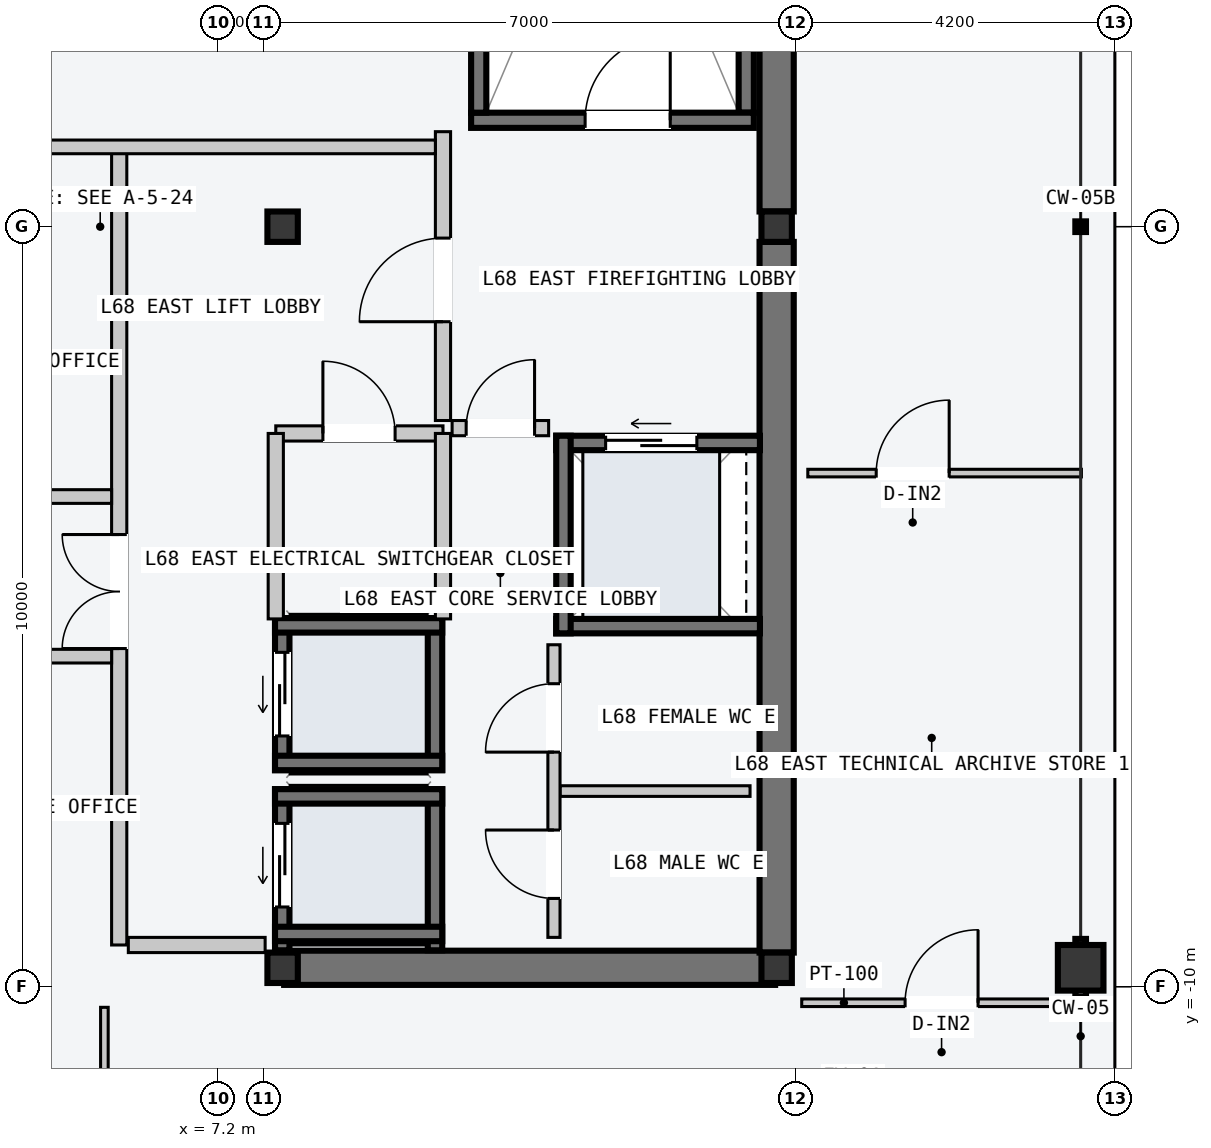
"""IFC4 building model, lengths in metres.
Left out: names, types, materials, properties, quantities, classifications, styles, units other than length and angle.
Written with IfcOpenShell. Run it as: python <this file> out.ifc"""

import sys

from ifc_helpers import new_model, si_unit, direction, frame, frame_2d, origin, origin_2d, place, context, subcontext, project, spatial, rectangle, hollow_rectangle, i_section, extrude, element, fill, save


model = new_model("IFC4")
c1 = context("Model", 3, precision=1e-05, world=origin(), true_north=direction((0.0, 1.0)))
c2 = subcontext(c1, "Body", "Model", "MODEL_VIEW")
j1 = project(units=[si_unit("LENGTHUNIT", "METRE"), si_unit("PLANEANGLEUNIT", "RADIAN")], contexts=[c1])
p1 = place(None, origin())
s1 = spatial("IfcSite", under=j1, at=p1, CompositionType="ELEMENT")
p2 = place(p1, origin())
s2 = spatial("IfcBuilding", under=s1, at=p2, CompositionType="ELEMENT")
p3 = place(p2, frame((0.0, 0.0, 258.0)))
s3 = spatial("IfcBuildingStorey", under=s2, at=p3, CompositionType="ELEMENT", Elevation=258.0)
p4 = place(p3, frame((8.07, -9.75, -0.2), z_axis=(0.0, 0.0, 1.0), x_axis=(1.0, 0.0, 0.0)))
e1 = element("IfcWall", 1, at=p4, inside=s3, PredefinedType="SHEAR", context=c2, shape_type="SweptSolid", body=[
    extrude(rectangle(XDim=6.46, YDim=0.45, at=frame_2d((3.23, 0.0))), origin(), (0.0, 0.0, 1.0), 3.6),
])
for number, where, z_axis, x_axis in (
    (2, (14.55, -9.55, -0.2), (0.0, 0.0, 1.0), (0.0, 1.0, 0.0)),
    (3, (14.55, 0.2, -0.2), (0.0, 0.0, 1.0), (0.0, 1.0, 0.0)),
):
    element("IfcWall", number, at=place(p3, frame(where, z_axis=z_axis, x_axis=x_axis)), inside=s3, PredefinedType="SHEAR", context=c2, shape_type="SweptSolid", body=[
        extrude(rectangle(XDim=9.35, YDim=0.45, at=frame_2d((4.675, 0.0))), origin(), (0.0, 0.0, 1.0), 3.6),
    ])
p5 = place(p3, frame((14.15, 1.5, -0.2), z_axis=(0.0, 0.0, 1.0), x_axis=(0.0, 1.0, 0.0)))
e4 = element("IfcWall", 4, at=p5, inside=s3, PredefinedType="SOLIDWALL", context=c2, shape_type="SweptSolid", body=[
    extrude(rectangle(XDim=7.8, YDim=0.2, at=frame_2d((3.9, 0.0))), origin(), (0.0, 0.0, 1.0), 3.6),
])
p6 = place(p3, frame((10.53, 1.4, -0.2), z_axis=(0.0, 0.0, 1.0), x_axis=(1.0, 0.0, 0.0)))
e5 = element("IfcWall", 5, at=p6, inside=s3, PredefinedType="SOLIDWALL", context=c2, shape_type="SweptSolid", body=[
    extrude(rectangle(XDim=3.72, YDim=0.2, at=frame_2d((1.86, 0.0))), origin(), (0.0, 0.0, 1.0), 3.6),
])
p7 = place(p6, frame((1.5, 0.0, 0.2)))
e6 = element("IfcOpeningElement", 6, at=p7, cuts=e5, PredefinedType="OPENING", context=c2, shape_type="SweptSolid", body=[
    extrude(rectangle(XDim=1.12, YDim=2.18, at=frame_2d((0.56, 1.09))), frame((0.0, 0.11, 0.0), z_axis=(0.0, -1.0, 0.0), x_axis=(1.0, 0.0, 0.0)), (0.0, 0.0, 1.0), 0.22),
])
p8 = place(p3, frame((10.63, 1.5, -0.2), z_axis=(0.0, 0.0, 1.0), x_axis=(0.0, 1.0, 0.0)))
e7 = element("IfcWall", 7, at=p8, inside=s3, PredefinedType="SOLIDWALL", context=c2, shape_type="SweptSolid", body=[
    extrude(rectangle(XDim=7.8, YDim=0.2, at=frame_2d((3.9, 0.0))), origin(), (0.0, 0.0, 1.0), 3.6),
])
for number, where, z_axis, x_axis in (
    (8, (8.05, -9.75, 0.0), (0.0, 0.0, 1.0), (1.0, 0.0, 0.0)),
    (9, (8.05, 0.0, 0.0), (0.0, 0.0, 1.0), (1.0, 0.0, 0.0)),
    (10, (14.55, -9.75, 0.0), (0.0, 0.0, 1.0), (1.0, 0.0, 0.0)),
    (11, (14.55, 0.0, 0.0), (0.0, 0.0, 1.0), (1.0, 0.0, 0.0)),
):
    element("IfcColumn", number, at=place(p3, frame(where, z_axis=z_axis, x_axis=x_axis)), inside=s3, PredefinedType="COLUMN", context=c2, shape_type="SweptSolid", body=[
        extrude(i_section(OverallWidth=0.4, OverallDepth=0.4, WebThickness=0.013, FlangeThickness=0.021, at=origin_2d()), origin(), (0.0, 0.0, 1.0), 3.6),
    ])
p9 = place(p3, frame((18.55, -9.75, 0.0), z_axis=(0.0, 0.0, 1.0), x_axis=(0.0, 1.0, 0.0)))
e12 = element("IfcColumn", 12, at=p9, inside=s3, PredefinedType="COLUMN", context=c2, shape_type="SweptSolid", body=[
    extrude(hollow_rectangle(XDim=0.6, YDim=0.6, WallThickness=0.025, at=origin_2d()), origin(), (0.0, 0.0, 1.0), 3.6),
])
p10 = place(p3, frame((8.045, -9.52, -0.2), z_axis=(0.0, 0.0, 1.0), x_axis=(0.0, 1.0, 0.0)))
e13 = element("IfcWall", 13, at=p10, inside=s3, PredefinedType="SOLIDWALL", context=c2, shape_type="SweptSolid", body=[
    extrude(rectangle(XDim=2.12, YDim=0.19, at=frame_2d((1.06, 0.0))), origin(), (0.0, 0.0, 1.0), 3.6),
])
p11 = place(p10, frame((0.57, 0.0, 0.2)))
e14 = element("IfcOpeningElement", 14, at=p11, cuts=e13, PredefinedType="OPENING", context=c2, shape_type="SweptSolid", body=[
    extrude(rectangle(XDim=1.1, YDim=2.2, at=frame_2d((0.55, 1.1))), frame((0.0, 0.105, 0.0), z_axis=(0.0, -1.0, 0.0), x_axis=(1.0, 0.0, 0.0)), (0.0, 0.0, 1.0), 0.21),
])
p12 = place(p3, frame((10.055, -9.52, -0.2), z_axis=(0.0, 0.0, 1.0), x_axis=(0.0, 1.0, 0.0)))
e15 = element("IfcWall", 15, at=p12, inside=s3, PredefinedType="SOLIDWALL", context=c2, shape_type="SweptSolid", body=[
    extrude(rectangle(XDim=2.12, YDim=0.19, at=frame_2d((1.06, 0.0))), origin(), (0.0, 0.0, 1.0), 3.6),
])
for number, where, z_axis, x_axis in (
    (16, (7.95, -7.495, -0.2), (0.0, 0.0, 1.0), (1.0, 0.0, 0.0)),
    (17, (7.95, -9.305, -0.2), (0.0, 0.0, 1.0), (1.0, 0.0, 0.0)),
):
    element("IfcWall", number, at=place(p3, frame(where, z_axis=z_axis, x_axis=x_axis)), inside=s3, PredefinedType="SOLIDWALL", context=c2, shape_type="SweptSolid", body=[
        extrude(rectangle(XDim=2.2, YDim=0.19, at=frame_2d((1.1, 0.0))), origin(), (0.0, 0.0, 1.0), 3.6),
    ])
p13 = place(p3, frame((8.045, -7.15, -0.2), z_axis=(0.0, 0.0, 1.0), x_axis=(0.0, 1.0, 0.0)))
e18 = element("IfcWall", 18, at=p13, inside=s3, PredefinedType="SOLIDWALL", context=c2, shape_type="SweptSolid", body=[
    extrude(rectangle(XDim=2.0, YDim=0.19, at=frame_2d((1.0, 0.0))), origin(), (0.0, 0.0, 1.0), 3.6),
])
p14 = place(p13, frame((0.45, 0.0, 0.2)))
e19 = element("IfcOpeningElement", 19, at=p14, cuts=e18, PredefinedType="OPENING", context=c2, shape_type="SweptSolid", body=[
    extrude(rectangle(XDim=1.1, YDim=2.2, at=frame_2d((0.55, 1.1))), frame((0.0, 0.105, 0.0), z_axis=(0.0, -1.0, 0.0), x_axis=(1.0, 0.0, 0.0)), (0.0, 0.0, 1.0), 0.21),
])
p15 = place(p3, frame((10.055, -7.15, -0.2), z_axis=(0.0, 0.0, 1.0), x_axis=(0.0, 1.0, 0.0)))
e20 = element("IfcWall", 20, at=p15, inside=s3, PredefinedType="SOLIDWALL", context=c2, shape_type="SweptSolid", body=[
    extrude(rectangle(XDim=2.0, YDim=0.19, at=frame_2d((1.0, 0.0))), origin(), (0.0, 0.0, 1.0), 3.6),
])
for number, where, z_axis, x_axis in (
    (21, (7.95, -5.245, -0.2), (0.0, 0.0, 1.0), (1.0, 0.0, 0.0)),
    (22, (7.95, -7.055, -0.2), (0.0, 0.0, 1.0), (1.0, 0.0, 0.0)),
):
    element("IfcWall", number, at=place(p3, frame(where, z_axis=z_axis, x_axis=x_axis)), inside=s3, PredefinedType="SOLIDWALL", context=c2, shape_type="SweptSolid", body=[
        extrude(rectangle(XDim=2.2, YDim=0.19, at=frame_2d((1.1, 0.0))), origin(), (0.0, 0.0, 1.0), 3.6),
    ])
p16 = place(p3, frame((11.65, -2.845, -0.2), z_axis=(0.0, 0.0, 1.0), x_axis=(1.0, 0.0, 0.0)))
e23 = element("IfcWall", 23, at=p16, inside=s3, PredefinedType="SOLIDWALL", context=c2, shape_type="SweptSolid", body=[
    extrude(rectangle(XDim=2.68, YDim=0.19, at=frame_2d((1.34, 0.0))), origin(), (0.0, 0.0, 1.0), 3.6),
])
p17 = place(p16, frame((0.65, 0.0, 0.2)))
e24 = element("IfcOpeningElement", 24, at=p17, cuts=e23, PredefinedType="OPENING", context=c2, shape_type="SweptSolid", body=[
    extrude(rectangle(XDim=1.2, YDim=2.2, at=frame_2d((0.6, 1.1))), frame((0.0, 0.105, 0.0), z_axis=(0.0, -1.0, 0.0), x_axis=(1.0, 0.0, 0.0)), (0.0, 0.0, 1.0), 0.21),
])
p18 = place(p3, frame((11.65, -5.255, -0.2), z_axis=(0.0, 0.0, 1.0), x_axis=(1.0, 0.0, 0.0)))
e25 = element("IfcWall", 25, at=p18, inside=s3, PredefinedType="SOLIDWALL", context=c2, shape_type="SweptSolid", body=[
    extrude(rectangle(XDim=2.68, YDim=0.19, at=frame_2d((1.34, 0.0))), origin(), (0.0, 0.0, 1.0), 3.6),
])
p19 = place(p3, frame((11.745, -5.35, -0.2), z_axis=(0.0, 0.0, 1.0), x_axis=(0.0, 1.0, 0.0)))
e26 = element("IfcWall", 26, at=p19, inside=s3, PredefinedType="SOLIDWALL", context=c2, shape_type="SweptSolid", body=[
    extrude(rectangle(XDim=2.6, YDim=0.19, at=frame_2d((1.3, 0.0))), origin(), (0.0, 0.0, 1.0), 3.6),
])
p20 = place(p3, frame((5.9, -9.45, 0.0), z_axis=(0.0, 0.0, 1.0), x_axis=(0.0, 1.0, 0.0)))
e27 = element("IfcWall", 27, at=p20, inside=s3, PredefinedType="PARTITIONING", context=c2, shape_type="SweptSolid", body=[
    extrude(rectangle(XDim=10.5, YDim=0.2, at=frame_2d((5.25, 0.0))), origin(), (0.0, 0.0, 1.0), 3.4),
])
p21 = place(p20, frame((3.9, 0.0, 0.0)))
e28 = element("IfcOpeningElement", 28, at=p21, cuts=e27, PredefinedType="OPENING", context=c2, shape_type="SweptSolid", body=[
    extrude(rectangle(XDim=1.5, YDim=2.2, at=frame_2d((0.75, 1.1))), frame((0.0, 0.11, 0.0), z_axis=(0.0, -1.0, 0.0), x_axis=(1.0, 0.0, 0.0)), (0.0, 0.0, 1.0), 0.22),
])
p22 = place(p3, frame((6.02, -9.45, 0.0), z_axis=(0.0, 0.0, 1.0), x_axis=(1.0, 0.0, 0.0)))
e29 = element("IfcWall", 29, at=p22, inside=s3, PredefinedType="PARTITIONING", context=c2, shape_type="SweptSolid", body=[
    extrude(rectangle(XDim=1.8, YDim=0.2, at=frame_2d((0.9, 0.0))), origin(), (0.0, 0.0, 1.0), 3.4),
])
p23 = place(p3, frame((10.16, -2.55, 0.0), z_axis=(0.0, 0.0, 1.0), x_axis=(0.0, 1.0, 0.0)))
e30 = element("IfcWall", 30, at=p23, inside=s3, PredefinedType="PARTITIONING", context=c2, shape_type="SweptSolid", body=[
    extrude(rectangle(XDim=3.8, YDim=0.2, at=frame_2d((1.9, 0.0))), origin(), (0.0, 0.0, 1.0), 3.4),
])
p24 = place(p23, frame((1.3, 0.0, 0.0)))
e31 = element("IfcOpeningElement", 31, at=p24, cuts=e30, PredefinedType="OPENING", context=c2, shape_type="SweptSolid", body=[
    extrude(rectangle(XDim=1.1, YDim=2.15, at=frame_2d((0.55, 1.075))), frame((0.0, 0.11, 0.0), z_axis=(0.0, -1.0, 0.0), x_axis=(1.0, 0.0, 0.0)), (0.0, 0.0, 1.0), 0.22),
])
p25 = place(p3, frame((10.28, -2.65, 0.0), z_axis=(0.0, 0.0, 1.0), x_axis=(1.0, 0.0, 0.0)))
e32 = element("IfcWall", 32, at=p25, inside=s3, PredefinedType="PARTITIONING", context=c2, shape_type="SweptSolid", body=[
    extrude(rectangle(XDim=1.27, YDim=0.2, at=frame_2d((0.635, 0.0))), origin(), (0.0, 0.0, 1.0), 3.4),
])
p26 = place(p25, frame((0.185, 0.0, 0.0)))
e33 = element("IfcOpeningElement", 33, at=p26, cuts=e32, PredefinedType="OPENING", context=c2, shape_type="SweptSolid", body=[
    extrude(rectangle(XDim=0.9, YDim=2.15, at=frame_2d((0.45, 1.075))), frame((0.0, 0.11, 0.0), z_axis=(0.0, -1.0, 0.0), x_axis=(1.0, 0.0, 0.0)), (0.0, 0.0, 1.0), 0.22),
])
p27 = place(p3, frame((7.96, -2.72, 0.0), z_axis=(0.0, 0.0, 1.0), x_axis=(1.0, 0.0, 0.0)))
e34 = element("IfcWall", 34, at=p27, inside=s3, PredefinedType="PARTITIONING", context=c2, shape_type="SweptSolid", body=[
    extrude(rectangle(XDim=2.2, YDim=0.2, at=frame_2d((1.1, 0.0))), origin(), (0.0, 0.0, 1.0), 3.4),
])
p28 = place(p27, frame((0.62, 0.0, 0.0)))
e35 = element("IfcOpeningElement", 35, at=p28, cuts=e34, PredefinedType="OPENING", context=c2, shape_type="SweptSolid", body=[
    extrude(rectangle(XDim=0.95, YDim=2.1, at=frame_2d((0.475, 1.05))), frame((0.0, 0.11, 0.0), z_axis=(0.0, -1.0, 0.0), x_axis=(1.0, 0.0, 0.0)), (0.0, 0.0, 1.0), 0.22),
])
for number, where, z_axis, x_axis in (
    (36, (7.96, -5.16, 0.0), (0.0, 0.0, 1.0), (0.0, 1.0, 0.0)),
    (37, (10.16, -5.16, 0.0), (0.0, 0.0, 1.0), (0.0, 1.0, 0.0)),
):
    element("IfcWall", number, at=place(p3, frame(where, z_axis=z_axis, x_axis=x_axis)), inside=s3, PredefinedType="PARTITIONING", context=c2, shape_type="SweptSolid", body=[
        extrude(rectangle(XDim=2.44, YDim=0.2, at=frame_2d((1.22, 0.0))), origin(), (0.0, 0.0, 1.0), 3.4),
    ])
p29 = place(p3, frame((11.7, -7.425, 0.0), z_axis=(0.0, 0.0, 1.0), x_axis=(1.0, 0.0, 0.0)))
e38 = element("IfcWall", 38, at=p29, inside=s3, PredefinedType="PARTITIONING", context=c2, shape_type="SweptSolid", body=[
    extrude(rectangle(XDim=2.5, YDim=0.14, at=frame_2d((1.25, 0.0))), origin(), (0.0, 0.0, 1.0), 3.4),
])
p30 = place(p3, frame((11.62, -9.35, 0.0), z_axis=(0.0, 0.0, 1.0), x_axis=(0.0, 1.0, 0.0)))
e39 = element("IfcWall", 39, at=p30, inside=s3, PredefinedType="PARTITIONING", context=c2, shape_type="SweptSolid", body=[
    extrude(rectangle(XDim=3.85, YDim=0.16, at=frame_2d((1.925, 0.0))), origin(), (0.0, 0.0, 1.0), 3.4),
])
p31 = place(p30, frame((0.512, 0.0, 0.0)))
e40 = element("IfcOpeningElement", 40, at=p31, cuts=e39, PredefinedType="OPENING", context=c2, shape_type="SweptSolid", body=[
    extrude(rectangle(XDim=0.9, YDim=2.15, at=frame_2d((0.45, 1.075))), frame((0.0, 0.09, 0.0), z_axis=(0.0, -1.0, 0.0), x_axis=(1.0, 0.0, 0.0)), (0.0, 0.0, 1.0), 0.18),
])
p32 = place(p30, frame((2.438, 0.0, 0.0)))
e41 = element("IfcOpeningElement", 41, at=p32, cuts=e39, PredefinedType="OPENING", context=c2, shape_type="SweptSolid", body=[
    extrude(rectangle(XDim=0.9, YDim=2.15, at=frame_2d((0.45, 1.075))), frame((0.0, 0.09, 0.0), z_axis=(0.0, -1.0, 0.0), x_axis=(1.0, 0.0, 0.0)), (0.0, 0.0, 1.0), 0.18),
])
p33 = place(p3, frame((1.26, 1.05, 0.0), z_axis=(0.0, 0.0, 1.0), x_axis=(1.0, 0.0, 0.0)))
e42 = element("IfcWall", 42, at=p33, inside=s3, PredefinedType="PARTITIONING", context=c2, shape_type="SweptSolid", body=[
    extrude(rectangle(XDim=8.8, YDim=0.18, at=frame_2d((4.4, 0.0))), origin(), (0.0, 0.0, 1.0), 3.4),
])
for number, where, z_axis, x_axis in (
    (43, (1.26, -3.55, 0.0), (0.0, 0.0, 1.0), (1.0, 0.0, 0.0)),
    (44, (1.26, -5.65, 0.0), (0.0, 0.0, 1.0), (1.0, 0.0, 0.0)),
):
    element("IfcWall", number, at=place(p3, frame(where, z_axis=z_axis, x_axis=x_axis)), inside=s3, PredefinedType="PARTITIONING", context=c2, shape_type="SweptSolid", body=[
        extrude(rectangle(XDim=4.54, YDim=0.18, at=frame_2d((2.27, 0.0))), origin(), (0.0, 0.0, 1.0), 3.4),
    ])
p34 = place(p3, frame((5.705, -17.56, 0.0), z_axis=(0.0, 0.0, 1.0), x_axis=(0.0, 1.0, 0.0)))
e45 = element("IfcWall", 45, at=p34, inside=s3, PredefinedType="PARTITIONING", context=c2, shape_type="SweptSolid", body=[
    extrude(rectangle(XDim=7.29, YDim=0.1, at=frame_2d((3.645, 0.0))), origin(), (0.0, 0.0, 1.0), 3.4),
])
p35 = place(p34, frame((1.05, 0.0, 0.0)))
e46 = element("IfcOpeningElement", 46, at=p35, cuts=e45, PredefinedType="OPENING", context=c2, shape_type="SweptSolid", body=[
    extrude(rectangle(XDim=0.96, YDim=2.18, at=frame_2d((0.48, 1.09))), frame((0.0, 0.06, 0.0), z_axis=(0.0, -1.0, 0.0), x_axis=(1.0, 0.0, 0.0)), (0.0, 0.0, 1.0), 0.12),
])
p36 = place(p3, frame((14.88, -10.21, 0.0), z_axis=(0.0, 0.0, 1.0), x_axis=(1.0, 0.0, 0.0)))
e47 = element("IfcWall", 47, at=p36, inside=s3, PredefinedType="PARTITIONING", context=c2, shape_type="SweptSolid", body=[
    extrude(rectangle(XDim=3.68, YDim=0.1, at=frame_2d((1.84, 0.0))), origin(), (0.0, 0.0, 1.0), 3.4),
])
p37 = place(p36, frame((1.36, 0.0, 0.0)))
e48 = element("IfcOpeningElement", 48, at=p37, cuts=e47, PredefinedType="OPENING", context=c2, shape_type="SweptSolid", body=[
    extrude(rectangle(XDim=0.96, YDim=2.18, at=frame_2d((0.48, 1.09))), frame((0.0, 0.06, 0.0), z_axis=(0.0, -1.0, 0.0), x_axis=(1.0, 0.0, 0.0)), (0.0, 0.0, 1.0), 0.12),
])
p38 = place(p3, frame((14.96, -3.242, 0.0), z_axis=(0.0, 0.0, 1.0), x_axis=(1.0, 0.0, 0.0)))
e49 = element("IfcWall", 49, at=p38, inside=s3, PredefinedType="PARTITIONING", context=c2, shape_type="SweptSolid", body=[
    extrude(rectangle(XDim=3.6, YDim=0.1, at=frame_2d((1.8, 0.0))), origin(), (0.0, 0.0, 1.0), 3.05),
])
p39 = place(p38, frame((0.9, 0.0, 0.0)))
e50 = element("IfcOpeningElement", 50, at=p39, cuts=e49, PredefinedType="OPENING", context=c2, shape_type="SweptSolid", body=[
    extrude(rectangle(XDim=0.96, YDim=2.18, at=frame_2d((0.48, 1.09))), frame((0.0, 0.06, 0.0), z_axis=(0.0, -1.0, 0.0), x_axis=(1.0, 0.0, 0.0)), (0.0, 0.0, 1.0), 0.12),
])
p40 = place(p7, origin())
e51 = element("IfcDoor", 51, at=p40, inside=s3, OperationType="SINGLE_SWING_RIGHT", PredefinedType="DOOR", context=c2, shape_type="SweptSolid", body=[
    extrude(rectangle(XDim=1.12, YDim=2.18, at=frame_2d((0.56, 1.09))), frame((0.0, 0.025, 0.0), z_axis=(0.0, -1.0, 0.0), x_axis=(1.0, 0.0, 0.0)), (0.0, 0.0, 1.0), 0.05),
])
fill(e6, e51)
p41 = place(p11, origin())
e52 = element("IfcDoor", 52, at=p41, inside=s3, OperationType="SLIDING_TO_LEFT", PredefinedType="DOOR", context=c2, shape_type="SweptSolid", body=[
    extrude(rectangle(XDim=1.1, YDim=2.2, at=frame_2d((0.55, 1.1))), frame((0.0, 0.025, 0.0), z_axis=(0.0, -1.0, 0.0), x_axis=(1.0, 0.0, 0.0)), (0.0, 0.0, 1.0), 0.05),
])
fill(e14, e52)
p42 = place(p14, origin())
e53 = element("IfcDoor", 53, at=p42, inside=s3, OperationType="SLIDING_TO_LEFT", PredefinedType="DOOR", context=c2, shape_type="SweptSolid", body=[
    extrude(rectangle(XDim=1.1, YDim=2.2, at=frame_2d((0.55, 1.1))), frame((0.0, 0.025, 0.0), z_axis=(0.0, -1.0, 0.0), x_axis=(1.0, 0.0, 0.0)), (0.0, 0.0, 1.0), 0.05),
])
fill(e19, e53)
p43 = place(p17, origin())
e54 = element("IfcDoor", 54, at=p43, inside=s3, OperationType="SLIDING_TO_LEFT", PredefinedType="DOOR", context=c2, shape_type="SweptSolid", body=[
    extrude(rectangle(XDim=1.2, YDim=2.2, at=frame_2d((0.6, 1.1))), frame((0.0, 0.025, 0.0), z_axis=(0.0, -1.0, 0.0), x_axis=(1.0, 0.0, 0.0)), (0.0, 0.0, 1.0), 0.05),
])
fill(e24, e54)
p44 = place(p21, origin())
e55 = element("IfcDoor", 55, at=p44, inside=s3, OperationType="DOUBLE_DOOR_SINGLE_SWING", PredefinedType="DOOR", context=c2, shape_type="SweptSolid", body=[
    extrude(rectangle(XDim=1.5, YDim=2.2, at=frame_2d((0.75, 1.1))), frame((0.0, 0.025, 0.0), z_axis=(0.0, -1.0, 0.0), x_axis=(1.0, 0.0, 0.0)), (0.0, 0.0, 1.0), 0.05),
])
fill(e28, e55)
p45 = place(p24, origin())
e56 = element("IfcDoor", 56, at=p45, inside=s3, OperationType="SINGLE_SWING_LEFT", PredefinedType="DOOR", context=c2, shape_type="SweptSolid", body=[
    extrude(rectangle(XDim=1.1, YDim=2.15, at=frame_2d((0.55, 1.075))), frame((0.0, 0.025, 0.0), z_axis=(0.0, -1.0, 0.0), x_axis=(1.0, 0.0, 0.0)), (0.0, 0.0, 1.0), 0.05),
])
fill(e31, e56)
p46 = place(p26, origin())
e57 = element("IfcDoor", 57, at=p46, inside=s3, OperationType="SINGLE_SWING_RIGHT", PredefinedType="DOOR", context=c2, shape_type="SweptSolid", body=[
    extrude(rectangle(XDim=0.9, YDim=2.15, at=frame_2d((0.45, 1.075))), frame((0.0, 0.025, 0.0), z_axis=(0.0, -1.0, 0.0), x_axis=(1.0, 0.0, 0.0)), (0.0, 0.0, 1.0), 0.05),
])
fill(e33, e57)
p47 = place(p28, origin())
e58 = element("IfcDoor", 58, at=p47, inside=s3, OperationType="SINGLE_SWING_LEFT", PredefinedType="DOOR", context=c2, shape_type="SweptSolid", body=[
    extrude(rectangle(XDim=0.95, YDim=2.1, at=frame_2d((0.475, 1.05))), frame((0.0, 0.025, 0.0), z_axis=(0.0, -1.0, 0.0), x_axis=(1.0, 0.0, 0.0)), (0.0, 0.0, 1.0), 0.05),
])
fill(e35, e58)
p48 = place(p31, origin())
e59 = element("IfcDoor", 59, at=p48, inside=s3, OperationType="SINGLE_SWING_RIGHT", PredefinedType="DOOR", context=c2, shape_type="SweptSolid", body=[
    extrude(rectangle(XDim=0.9, YDim=2.15, at=frame_2d((0.45, 1.075))), frame((0.0, 0.025, 0.0), z_axis=(0.0, -1.0, 0.0), x_axis=(1.0, 0.0, 0.0)), (0.0, 0.0, 1.0), 0.05),
])
fill(e40, e59)
p49 = place(p32, origin())
e60 = element("IfcDoor", 60, at=p49, inside=s3, OperationType="SINGLE_SWING_LEFT", PredefinedType="DOOR", context=c2, shape_type="SweptSolid", body=[
    extrude(rectangle(XDim=0.9, YDim=2.15, at=frame_2d((0.45, 1.075))), frame((0.0, 0.025, 0.0), z_axis=(0.0, -1.0, 0.0), x_axis=(1.0, 0.0, 0.0)), (0.0, 0.0, 1.0), 0.05),
])
fill(e41, e60)
p50 = place(p37, origin())
e61 = element("IfcDoor", 61, at=p50, inside=s3, OperationType="SINGLE_SWING_RIGHT", PredefinedType="DOOR", context=c2, shape_type="SweptSolid", body=[
    extrude(rectangle(XDim=0.96, YDim=2.18, at=frame_2d((0.48, 1.09))), frame((0.0, 0.025, 0.0), z_axis=(0.0, -1.0, 0.0), x_axis=(1.0, 0.0, 0.0)), (0.0, 0.0, 1.0), 0.05),
])
fill(e48, e61)
p51 = place(p39, origin())
e62 = element("IfcDoor", 62, at=p51, inside=s3, OperationType="SINGLE_SWING_RIGHT", PredefinedType="DOOR", context=c2, shape_type="SweptSolid", body=[
    extrude(rectangle(XDim=0.96, YDim=2.18, at=frame_2d((0.48, 1.09))), frame((0.0, 0.025, 0.0), z_axis=(0.0, -1.0, 0.0), x_axis=(1.0, 0.0, 0.0)), (0.0, 0.0, 1.0), 0.05),
])
fill(e50, e62)
save(model, sys.argv[1])
